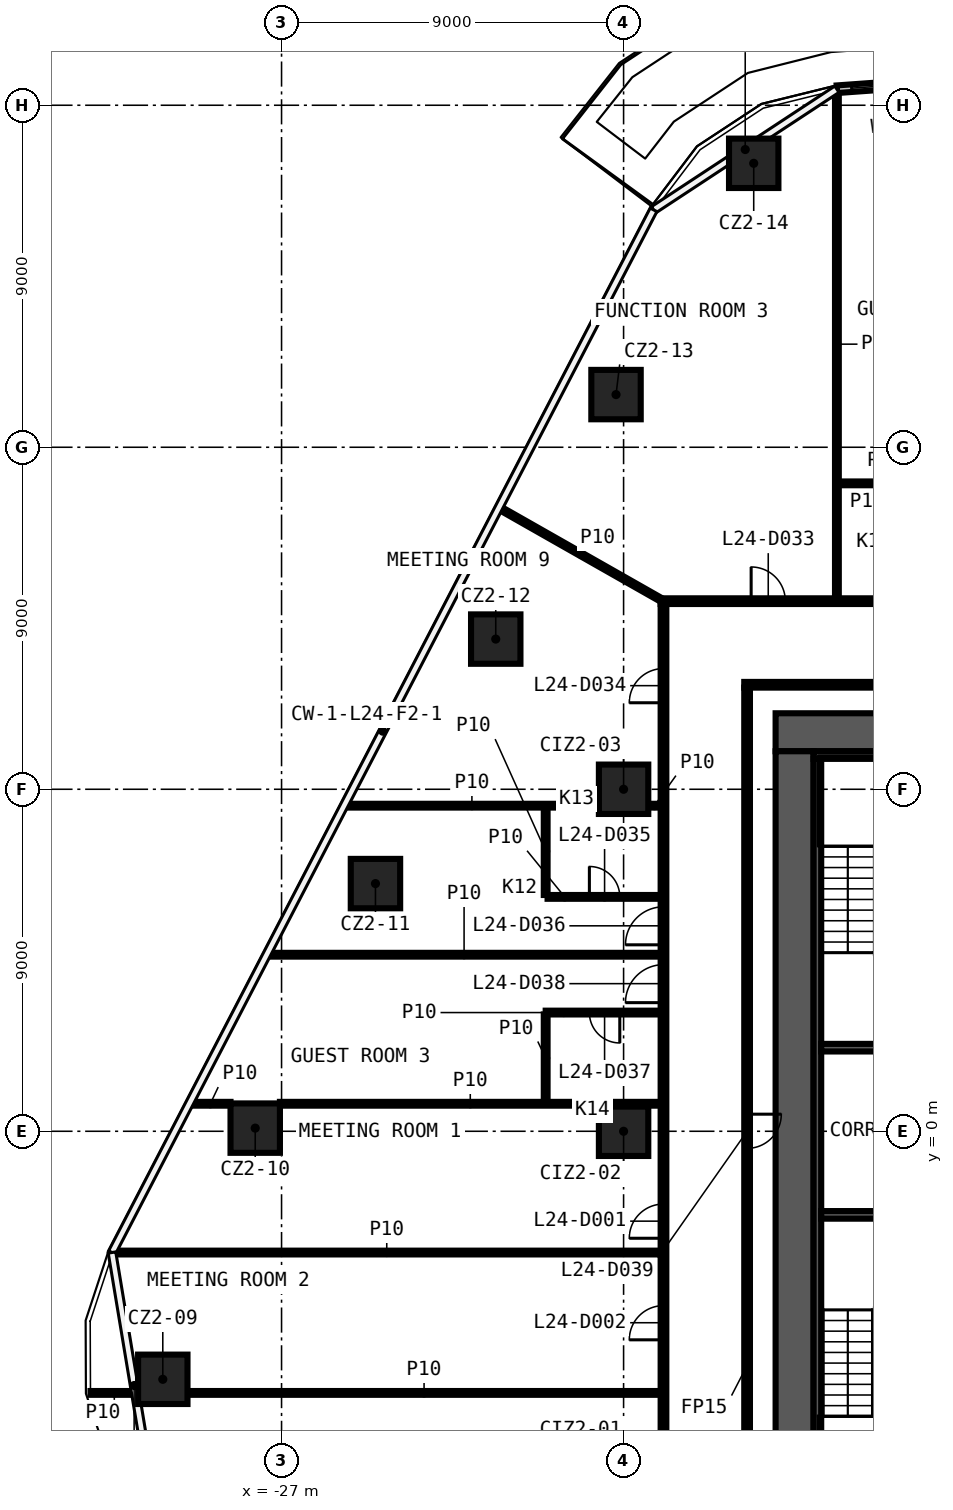
"""IFC4 building model, lengths in metres.
Left out: names, types, materials, properties, quantities, classifications, styles, units other than length and angle.
Written with IfcOpenShell. Run it as: python <this file> out.ifc"""

import sys

from ifc_helpers import new_model, si_unit, direction, frame, frame_2d, origin, origin_2d, place, context, subcontext, project, spatial, rectangle, extrude, element, fill, save


model = new_model("IFC4")
c1 = context("Model", 3, precision=1e-05, world=origin(), true_north=direction((0.0, 1.0)))
c2 = subcontext(c1, "Body", "Model", "MODEL_VIEW")
j1 = project(units=[si_unit("LENGTHUNIT", "METRE"), si_unit("PLANEANGLEUNIT", "RADIAN")], contexts=[c1])
p1 = place(None, origin())
s1 = spatial("IfcSite", under=j1, at=p1, CompositionType="ELEMENT")
p2 = place(p1, origin())
s2 = spatial("IfcBuilding", under=s1, at=p2, CompositionType="ELEMENT")
p3 = place(p2, frame((0.0, 0.0, 113.7)))
s3 = spatial("IfcBuildingStorey", under=s2, at=p3, CompositionType="ELEMENT", Elevation=113.7)
for number, where, z_axis, x_axis in (
    (1, (-30.125, -6.527, 0.0), (0.0, 0.0, 1.0), (1.0, 0.0, 0.0)),
    (2, (-27.693, 0.083, 0.0), (0.0, 0.0, 1.0), (1.0, 0.0, 0.0)),
    (3, (-24.529, 6.518, 0.0), (0.0, 0.0, 1.0), (1.0, 0.0, 0.0)),
    (4, (-21.364, 12.952, 0.0), (0.0, 0.0, 1.0), (1.0, 0.0, 0.0)),
    (5, (-18.199, 19.386, 0.0), (0.0, 0.0, 1.0), (1.0, 0.0, 0.0)),
    (6, (-14.576, 25.472, 0.0), (0.0, 0.0, 1.0), (1.0, 0.0, 0.0)),
    (7, (-18.0, 0.0, 0.0), (0.0, 0.0, 1.0), (1.0, 0.0, 0.0)),
    (8, (-18.0, 9.0, 0.0), (0.0, 0.0, 1.0), (1.0, 0.0, 0.0)),
):
    element("IfcColumn", number, at=place(p3, frame(where, z_axis=z_axis, x_axis=x_axis)), inside=s3, PredefinedType="COLUMN", context=c2, shape_type="SweptSolid", body=[
        extrude(rectangle(XDim=1.3, YDim=1.3, at=origin_2d()), origin(), (0.0, 0.0, 1.0), 3.3),
    ])
p4 = place(p3, frame((-32.027, -6.885, 0.0), z_axis=(0.0, 0.0, 1.0), x_axis=(1.0, 0.0, 0.0)))
e9 = element("IfcWall", 9, at=p4, inside=s3, PredefinedType="PARTITIONING", context=c2, shape_type="SweptSolid", body=[
    extrude(rectangle(XDim=1.252, YDim=0.1, at=frame_2d((0.626, 0.0))), origin(), (0.0, 0.0, 1.0), 3.3),
])
p5 = place(p3, frame((-29.475, -6.885, 0.0), z_axis=(0.0, 0.0, 1.0), x_axis=(1.0, 0.0, 0.0)))
e10 = element("IfcWall", 10, at=p5, inside=s3, PredefinedType="PARTITIONING", context=c2, shape_type="SweptSolid", body=[
    extrude(rectangle(XDim=12.45, YDim=0.1, at=frame_2d((6.225, 0.0))), origin(), (0.0, 0.0, 1.0), 3.3),
])
p6 = place(p3, frame((-31.439, -3.191, 0.0), z_axis=(0.0, 0.0, 1.0), x_axis=(1.0, 0.0, 0.0)))
e11 = element("IfcWall", 11, at=p6, inside=s3, PredefinedType="PARTITIONING", context=c2, shape_type="SweptSolid", body=[
    extrude(rectangle(XDim=14.414, YDim=0.1, at=frame_2d((7.207, 0.0))), origin(), (0.0, 0.0, 1.0), 3.3),
])
p7 = place(p3, frame((-29.406, 0.724, 0.0), z_axis=(0.0, 0.0, 1.0), x_axis=(1.0, 0.0, 0.0)))
e12 = element("IfcWall", 12, at=p7, inside=s3, PredefinedType="PARTITIONING", context=c2, shape_type="SweptSolid", body=[
    extrude(rectangle(XDim=1.063, YDim=0.1, at=frame_2d((0.531, 0.0))), origin(), (0.0, 0.0, 1.0), 3.3),
])
p8 = place(p3, frame((-27.043, 0.724, 0.0), z_axis=(0.0, 0.0, 1.0), x_axis=(1.0, 0.0, 0.0)))
e13 = element("IfcWall", 13, at=p8, inside=s3, PredefinedType="PARTITIONING", context=c2, shape_type="SweptSolid", body=[
    extrude(rectangle(XDim=10.018, YDim=0.1, at=frame_2d((5.009, 0.0))), origin(), (0.0, 0.0, 1.0), 3.3),
])
p9 = place(p3, frame((-17.025, 3.124, 0.0), z_axis=(0.0, 0.0, 1.0), x_axis=(-1.0, 0.0, 0.0)))
e14 = element("IfcWall", 14, at=p9, inside=s3, PredefinedType="PARTITIONING", context=c2, shape_type="SweptSolid", body=[
    extrude(rectangle(XDim=3.025, YDim=0.1, at=frame_2d((1.513, 0.0))), origin(), (0.0, 0.0, 1.0), 3.3),
])
p10 = place(p9, frame((1.075, 0.0, 0.0)))
e15 = element("IfcOpeningElement", 15, at=p10, cuts=e14, PredefinedType="OPENING", context=c2, shape_type="SweptSolid", body=[
    extrude(rectangle(XDim=0.8, YDim=2.1, at=frame_2d((0.4, 1.05))), frame((0.0, 0.06, 0.0), z_axis=(0.0, -1.0, 0.0), x_axis=(1.0, 0.0, 0.0)), (0.0, 0.0, 1.0), 0.12),
])
p11 = place(p3, frame((-27.369, 4.646, 0.0), z_axis=(0.0, 0.0, 1.0), x_axis=(1.0, 0.0, 0.0)))
e16 = element("IfcWall", 16, at=p11, inside=s3, PredefinedType="PARTITIONING", context=c2, shape_type="SweptSolid", body=[
    extrude(rectangle(XDim=10.344, YDim=0.1, at=frame_2d((5.172, 0.0))), origin(), (0.0, 0.0, 1.0), 3.3),
])
p12 = place(p3, frame((-20.0, 6.168, 0.0), z_axis=(0.0, 0.0, 1.0), x_axis=(1.0, 0.0, 0.0)))
e17 = element("IfcWall", 17, at=p12, inside=s3, PredefinedType="PARTITIONING", context=c2, shape_type="SweptSolid", body=[
    extrude(rectangle(XDim=2.975, YDim=0.1, at=frame_2d((1.488, 0.0))), origin(), (0.0, 0.0, 1.0), 3.3),
])
p13 = place(p12, frame((1.1, 0.0, 0.0)))
e18 = element("IfcOpeningElement", 18, at=p13, cuts=e17, PredefinedType="OPENING", context=c2, shape_type="SweptSolid", body=[
    extrude(rectangle(XDim=0.8, YDim=2.1, at=frame_2d((0.4, 1.05))), frame((0.0, 0.06, 0.0), z_axis=(0.0, -1.0, 0.0), x_axis=(1.0, 0.0, 0.0)), (0.0, 0.0, 1.0), 0.12),
])
p14 = place(p3, frame((-25.333, 8.568, 0.0), z_axis=(0.0, 0.0, 1.0), x_axis=(1.0, 0.0, 0.0)))
e19 = element("IfcWall", 19, at=p14, inside=s3, PredefinedType="PARTITIONING", context=c2, shape_type="SweptSolid", body=[
    extrude(rectangle(XDim=6.683, YDim=0.1, at=frame_2d((3.341, 0.0))), origin(), (0.0, 0.0, 1.0), 3.3),
])
p15 = place(p3, frame((-17.35, 8.568, 0.0), z_axis=(0.0, 0.0, 1.0), x_axis=(1.0, 0.0, 0.0)))
e20 = element("IfcWall", 20, at=p15, inside=s3, PredefinedType="PARTITIONING", context=c2, shape_type="SweptSolid", body=[
    extrude(rectangle(XDim=0.325, YDim=0.1, at=frame_2d((0.163, 0.0))), origin(), (0.0, 0.0, 1.0), 3.3),
])
p16 = place(p3, frame((-14.825, 11.75, 0.0), z_axis=(0.0, 0.0, 1.0), x_axis=(1.0, 0.0, 0.0)))
e21 = element("IfcWall", 21, at=p16, inside=s3, PredefinedType="PARTITIONING", context=c2, shape_type="SweptSolid", body=[
    extrude(rectangle(XDim=16.625, YDim=0.15, at=frame_2d((8.312, 0.0))), origin(), (0.0, 0.0, 1.0), 3.3),
])
p17 = place(p3, frame((-17.025, 13.95, 0.0), z_axis=(0.0, 0.0, 1.0), x_axis=(1.0, 0.0, 0.0)))
e22 = element("IfcWall", 22, at=p17, inside=s3, PredefinedType="PARTITIONING", context=c2, shape_type="SweptSolid", body=[
    extrude(rectangle(XDim=34.05, YDim=0.15, at=frame_2d((17.025, 0.0))), origin(), (0.0, 0.0, 1.0), 3.3),
])
p18 = place(p17, frame((29.735, 0.0, 0.0)))
e23 = element("IfcOpeningElement", 23, at=p18, cuts=e22, PredefinedType="OPENING", context=c2, shape_type="SweptSolid", body=[
    extrude(rectangle(XDim=1.0, YDim=2.1, at=frame_2d((0.5, 1.05))), frame((0.0, 0.085, 0.0), z_axis=(0.0, -1.0, 0.0), x_axis=(1.0, 0.0, 0.0)), (0.0, 0.0, 1.0), 0.17),
])
p19 = place(p17, frame((25.513, 0.0, 0.0)))
e24 = element("IfcOpeningElement", 24, at=p19, cuts=e22, PredefinedType="OPENING", context=c2, shape_type="SweptSolid", body=[
    extrude(rectangle(XDim=1.0, YDim=2.1, at=frame_2d((0.5, 1.05))), frame((0.0, 0.085, 0.0), z_axis=(0.0, -1.0, 0.0), x_axis=(1.0, 0.0, 0.0)), (0.0, 0.0, 1.0), 0.17),
])
p20 = place(p17, frame((18.631, 0.0, 0.0)))
e25 = element("IfcOpeningElement", 25, at=p20, cuts=e22, PredefinedType="OPENING", context=c2, shape_type="SweptSolid", body=[
    extrude(rectangle(XDim=1.0, YDim=2.1, at=frame_2d((0.5, 1.05))), frame((0.0, 0.085, 0.0), z_axis=(0.0, -1.0, 0.0), x_axis=(1.0, 0.0, 0.0)), (0.0, 0.0, 1.0), 0.17),
])
p21 = place(p17, frame((16.545, 0.0, 0.0)))
e26 = element("IfcOpeningElement", 26, at=p21, cuts=e22, PredefinedType="OPENING", context=c2, shape_type="SweptSolid", body=[
    extrude(rectangle(XDim=1.0, YDim=2.1, at=frame_2d((0.5, 1.05))), frame((0.0, 0.085, 0.0), z_axis=(0.0, -1.0, 0.0), x_axis=(1.0, 0.0, 0.0)), (0.0, 0.0, 1.0), 0.17),
])
p22 = place(p17, frame((9.659, 0.0, 0.0)))
e27 = element("IfcOpeningElement", 27, at=p22, cuts=e22, PredefinedType="OPENING", context=c2, shape_type="SweptSolid", body=[
    extrude(rectangle(XDim=1.0, YDim=2.1, at=frame_2d((0.5, 1.05))), frame((0.0, 0.085, 0.0), z_axis=(0.0, -1.0, 0.0), x_axis=(1.0, 0.0, 0.0)), (0.0, 0.0, 1.0), 0.17),
])
p23 = place(p17, frame((7.577, 0.0, 0.0)))
e28 = element("IfcOpeningElement", 28, at=p23, cuts=e22, PredefinedType="OPENING", context=c2, shape_type="SweptSolid", body=[
    extrude(rectangle(XDim=1.0, YDim=2.1, at=frame_2d((0.5, 1.05))), frame((0.0, 0.085, 0.0), z_axis=(0.0, -1.0, 0.0), x_axis=(1.0, 0.0, 0.0)), (0.0, 0.0, 1.0), 0.17),
])
p24 = place(p17, frame((2.381, 0.0, 0.0)))
e29 = element("IfcOpeningElement", 29, at=p24, cuts=e22, PredefinedType="OPENING", context=c2, shape_type="SweptSolid", body=[
    extrude(rectangle(XDim=0.9, YDim=2.1, at=frame_2d((0.45, 1.05))), frame((0.0, 0.085, 0.0), z_axis=(0.0, -1.0, 0.0), x_axis=(1.0, 0.0, 0.0)), (0.0, 0.0, 1.0), 0.17),
])
p25 = place(p3, frame((-12.337, 17.05, 0.0), z_axis=(0.0, 0.0, 1.0), x_axis=(1.0, 0.0, 0.0)))
e30 = element("IfcWall", 30, at=p25, inside=s3, PredefinedType="PARTITIONING", context=c2, shape_type="SweptSolid", body=[
    extrude(rectangle(XDim=2.4, YDim=0.1, at=frame_2d((1.2, 0.0))), origin(), (0.0, 0.0, 1.0), 3.3),
])
p26 = place(p3, frame((-12.387, 14.025, 0.0), z_axis=(0.0, 0.0, 1.0), x_axis=(0.0, 1.0, 0.0)))
e31 = element("IfcWall", 31, at=p26, inside=s3, PredefinedType="PARTITIONING", context=c2, shape_type="SweptSolid", body=[
    extrude(rectangle(XDim=13.376, YDim=0.1, at=frame_2d((6.688, 0.0))), origin(), (0.0, 0.0, 1.0), 3.3),
])
p27 = place(p3, frame((-14.75, 11.675, 0.0), z_axis=(0.0, 0.0, 1.0), x_axis=(0.0, -1.0, 0.0)))
e32 = element("IfcWall", 32, at=p27, inside=s3, PredefinedType="PARTITIONING", context=c2, shape_type="SweptSolid", body=[
    extrude(rectangle(XDim=23.35, YDim=0.15, at=frame_2d((11.675, 0.0))), origin(), (0.0, 0.0, 1.0), 3.3),
])
p28 = place(p27, frame((11.225, 0.0, 0.0)))
e33 = element("IfcOpeningElement", 33, at=p28, cuts=e32, PredefinedType="OPENING", context=c2, shape_type="SweptSolid", body=[
    extrude(rectangle(XDim=0.9, YDim=2.1, at=frame_2d((0.45, 1.05))), frame((0.0, 0.085, 0.0), z_axis=(0.0, -1.0, 0.0), x_axis=(1.0, 0.0, 0.0)), (0.0, 0.0, 1.0), 0.17),
])
p29 = place(p3, frame((-16.95, -13.875, 0.0), z_axis=(0.0, 0.0, 1.0), x_axis=(0.0, 1.0, 0.0)))
e34 = element("IfcWall", 34, at=p29, inside=s3, PredefinedType="PARTITIONING", context=c2, shape_type="SweptSolid", body=[
    extrude(rectangle(XDim=27.75, YDim=0.15, at=frame_2d((13.875, 0.0))), origin(), (0.0, 0.0, 1.0), 3.3),
])
p30 = place(p29, frame((11.06, 0.0, 0.0)))
e35 = element("IfcOpeningElement", 35, at=p30, cuts=e34, PredefinedType="OPENING", context=c2, shape_type="SweptSolid", body=[
    extrude(rectangle(XDim=0.9, YDim=2.1, at=frame_2d((0.45, 1.05))), frame((0.0, 0.085, 0.0), z_axis=(0.0, -1.0, 0.0), x_axis=(1.0, 0.0, 0.0)), (0.0, 0.0, 1.0), 0.17),
])
p31 = place(p29, frame((8.387, 0.0, 0.0)))
e36 = element("IfcOpeningElement", 36, at=p31, cuts=e34, PredefinedType="OPENING", context=c2, shape_type="SweptSolid", body=[
    extrude(rectangle(XDim=0.9, YDim=2.1, at=frame_2d((0.45, 1.05))), frame((0.0, 0.085, 0.0), z_axis=(0.0, -1.0, 0.0), x_axis=(1.0, 0.0, 0.0)), (0.0, 0.0, 1.0), 0.17),
])
p32 = place(p29, frame((1.666, 0.0, 0.0)))
e37 = element("IfcOpeningElement", 37, at=p32, cuts=e34, PredefinedType="OPENING", context=c2, shape_type="SweptSolid", body=[
    extrude(rectangle(XDim=0.9, YDim=2.1, at=frame_2d((0.45, 1.05))), frame((0.0, 0.085, 0.0), z_axis=(0.0, -1.0, 0.0), x_axis=(1.0, 0.0, 0.0)), (0.0, 0.0, 1.0), 0.17),
])
p33 = place(p29, frame((25.152, 0.0, 0.0)))
e38 = element("IfcOpeningElement", 38, at=p33, cuts=e34, PredefinedType="OPENING", context=c2, shape_type="SweptSolid", body=[
    extrude(rectangle(XDim=0.9, YDim=2.1, at=frame_2d((0.45, 1.05))), frame((0.0, 0.085, 0.0), z_axis=(0.0, -1.0, 0.0), x_axis=(1.0, 0.0, 0.0)), (0.0, 0.0, 1.0), 0.17),
])
p34 = place(p29, frame((18.782, 0.0, 0.0)))
e39 = element("IfcOpeningElement", 39, at=p34, cuts=e34, PredefinedType="OPENING", context=c2, shape_type="SweptSolid", body=[
    extrude(rectangle(XDim=1.0, YDim=2.1, at=frame_2d((0.5, 1.05))), frame((0.0, 0.085, 0.0), z_axis=(0.0, -1.0, 0.0), x_axis=(1.0, 0.0, 0.0)), (0.0, 0.0, 1.0), 0.17),
])
p35 = place(p29, frame((17.26, 0.0, 0.0)))
e40 = element("IfcOpeningElement", 40, at=p35, cuts=e34, PredefinedType="OPENING", context=c2, shape_type="SweptSolid", body=[
    extrude(rectangle(XDim=1.0, YDim=2.1, at=frame_2d((0.5, 1.05))), frame((0.0, 0.085, 0.0), z_axis=(0.0, -1.0, 0.0), x_axis=(1.0, 0.0, 0.0)), (0.0, 0.0, 1.0), 0.17),
])
p36 = place(p3, frame((-20.05, 0.774, 0.0), z_axis=(0.0, 0.0, 1.0), x_axis=(0.0, 1.0, 0.0)))
e41 = element("IfcWall", 41, at=p36, inside=s3, PredefinedType="PARTITIONING", context=c2, shape_type="SweptSolid", body=[
    extrude(rectangle(XDim=2.3, YDim=0.1, at=frame_2d((1.15, 0.0))), origin(), (0.0, 0.0, 1.0), 3.3),
])
p37 = place(p3, frame((-20.05, 6.218, 0.0), z_axis=(0.0, 0.0, 1.0), x_axis=(0.0, 1.0, 0.0)))
e42 = element("IfcWall", 42, at=p37, inside=s3, PredefinedType="PARTITIONING", context=c2, shape_type="SweptSolid", body=[
    extrude(rectangle(XDim=2.3, YDim=0.1, at=frame_2d((1.15, 0.0))), origin(), (0.0, 0.0, 1.0), 3.3),
])
p38 = place(p3, frame((-21.264, 16.401, 0.0), z_axis=(0.0, 0.0, 1.0), x_axis=(0.869409483432, -0.494092248592, 0.0)))
e43 = element("IfcWall", 43, at=p38, inside=s3, PredefinedType="PARTITIONING", context=c2, shape_type="SweptSolid", body=[
    extrude(rectangle(XDim=4.962, YDim=0.1, at=frame_2d((2.481, 0.0))), origin(), (0.0, 0.0, 1.0), 3.3),
])
p39 = place(p3, frame((-7.909, 27.743, 0.0), z_axis=(0.0, 0.0, 1.0), x_axis=(-0.997423796537, -0.071734023317, 0.0)))
e44 = element("IfcWall", 44, at=p39, inside=s3, PredefinedType="SOLIDWALL", context=c2, shape_type="SweptSolid", body=[
    extrude(rectangle(XDim=4.489, YDim=0.2, at=frame_2d((2.245, 0.0))), origin(), (0.0, 0.0, 1.0), 3.3),
])
p40 = place(p39, frame((2.5, 0.0, 0.6)))
e45 = element("IfcOpeningElement", 45, at=p40, cuts=e44, PredefinedType="OPENING", context=c2, shape_type="SweptSolid", body=[
    extrude(rectangle(XDim=1.6, YDim=2.4, at=frame_2d((0.8, 1.2))), frame((0.0, 0.11, 0.0), z_axis=(0.0, -1.0, 0.0), x_axis=(1.0, 0.0, 0.0)), (0.0, 0.0, 1.0), 0.22),
])
p41 = place(p39, frame((1.0, 0.0, 0.0)))
e46 = element("IfcOpeningElement", 46, at=p41, cuts=e44, PredefinedType="OPENING", context=c2, shape_type="SweptSolid", body=[
    extrude(rectangle(XDim=1.2, YDim=2.4, at=frame_2d((0.6, 1.2))), frame((0.0, 0.11, 0.0), z_axis=(0.0, -1.0, 0.0), x_axis=(1.0, 0.0, 0.0)), (0.0, 0.0, 1.0), 0.22),
])
p42 = place(p3, frame((-14.0, 10.5, 0.0), z_axis=(0.0, 0.0, 1.0), x_axis=(1.0, 0.0, 0.0)))
e47 = element("IfcWall", 47, at=p42, inside=s3, PredefinedType="SHEAR", context=c2, shape_type="SweptSolid", body=[
    extrude(rectangle(XDim=28.0, YDim=1.0, at=frame_2d((14.0, 0.0))), origin(), (0.0, 0.0, 1.0), 3.3),
])
p43 = place(p42, frame((15.9, 0.0, 0.0)))
e48 = element("IfcOpeningElement", 48, at=p43, cuts=e47, PredefinedType="OPENING", context=c2, shape_type="SweptSolid", body=[
    extrude(rectangle(XDim=1.6, YDim=2.1, at=frame_2d((0.8, 1.05))), frame((0.0, 0.51, 0.0), z_axis=(0.0, -1.0, 0.0), x_axis=(1.0, 0.0, 0.0)), (0.0, 0.0, 1.0), 1.02),
])
p44 = place(p3, frame((-13.5, -10.0, 0.0), z_axis=(0.0, 0.0, 1.0), x_axis=(0.0, 1.0, 0.0)))
e49 = element("IfcWall", 49, at=p44, inside=s3, PredefinedType="SHEAR", context=c2, shape_type="SweptSolid", body=[
    extrude(rectangle(XDim=20.0, YDim=1.0, at=frame_2d((10.0, 0.0))), origin(), (0.0, 0.0, 1.0), 3.3),
])
p45 = place(p3, frame((-13.0, 9.9, 0.0), z_axis=(0.0, 0.0, 1.0), x_axis=(1.0, 0.0, 0.0)))
e50 = element("IfcWall", 50, at=p45, inside=s3, PredefinedType="SHEAR", context=c2, shape_type="SweptSolid", body=[
    extrude(rectangle(XDim=14.5, YDim=0.2, at=frame_2d((7.25, 0.0))), origin(), (0.0, 0.0, 1.0), 3.3),
])
p46 = place(p3, frame((-12.9, -9.8, 0.0), z_axis=(0.0, 0.0, 1.0), x_axis=(0.0, 1.0, 0.0)))
e51 = element("IfcWall", 51, at=p46, inside=s3, PredefinedType="SHEAR", context=c2, shape_type="SweptSolid", body=[
    extrude(rectangle(XDim=19.6, YDim=0.2, at=frame_2d((9.8, 0.0))), origin(), (0.0, 0.0, 1.0), 3.3),
])
for number, where, z_axis, x_axis in (
    (52, (-9.45, 2.2, 0.0), (0.0, 0.0, 1.0), (-1.0, 0.0, 0.0)),
    (53, (-9.45, -2.2, 0.0), (0.0, 0.0, 1.0), (-1.0, 0.0, 0.0)),
):
    element("IfcWall", number, at=place(p3, frame(where, z_axis=z_axis, x_axis=x_axis)), inside=s3, PredefinedType="SHEAR", context=c2, shape_type="SweptSolid", body=[
        extrude(rectangle(XDim=3.35, YDim=0.2, at=frame_2d((1.675, 0.0))), origin(), (0.0, 0.0, 1.0), 3.3),
    ])
p47 = place(p30, origin())
e54 = element("IfcDoor", 54, at=p47, inside=s3, OperationType="SINGLE_SWING_RIGHT", PredefinedType="DOOR", context=c2, shape_type="SweptSolid", body=[
    extrude(rectangle(XDim=0.9, YDim=2.1, at=frame_2d((0.45, 1.05))), frame((0.0, 0.025, 0.0), z_axis=(0.0, -1.0, 0.0), x_axis=(1.0, 0.0, 0.0)), (0.0, 0.0, 1.0), 0.05),
])
fill(e35, e54)
p48 = place(p31, origin())
e55 = element("IfcDoor", 55, at=p48, inside=s3, OperationType="SINGLE_SWING_LEFT", PredefinedType="DOOR", context=c2, shape_type="SweptSolid", body=[
    extrude(rectangle(XDim=0.9, YDim=2.1, at=frame_2d((0.45, 1.05))), frame((0.0, 0.025, 0.0), z_axis=(0.0, -1.0, 0.0), x_axis=(1.0, 0.0, 0.0)), (0.0, 0.0, 1.0), 0.05),
])
fill(e36, e55)
p49 = place(p24, origin())
e56 = element("IfcDoor", 56, at=p49, inside=s3, OperationType="SINGLE_SWING_RIGHT", PredefinedType="DOOR", context=c2, shape_type="SweptSolid", body=[
    extrude(rectangle(XDim=0.9, YDim=2.1, at=frame_2d((0.45, 1.05))), frame((0.0, 0.025, 0.0), z_axis=(0.0, -1.0, 0.0), x_axis=(1.0, 0.0, 0.0)), (0.0, 0.0, 1.0), 0.05),
])
fill(e29, e56)
p50 = place(p33, origin())
e57 = element("IfcDoor", 57, at=p50, inside=s3, OperationType="SINGLE_SWING_LEFT", PredefinedType="DOOR", context=c2, shape_type="SweptSolid", body=[
    extrude(rectangle(XDim=0.9, YDim=2.1, at=frame_2d((0.45, 1.05))), frame((0.0, 0.025, 0.0), z_axis=(0.0, -1.0, 0.0), x_axis=(1.0, 0.0, 0.0)), (0.0, 0.0, 1.0), 0.05),
])
fill(e38, e57)
p51 = place(p13, origin())
e58 = element("IfcDoor", 58, at=p51, inside=s3, OperationType="SINGLE_SWING_LEFT", PredefinedType="DOOR", context=c2, shape_type="SweptSolid", body=[
    extrude(rectangle(XDim=0.8, YDim=2.1, at=frame_2d((0.4, 1.05))), frame((0.0, 0.025, 0.0), z_axis=(0.0, -1.0, 0.0), x_axis=(1.0, 0.0, 0.0)), (0.0, 0.0, 1.0), 0.05),
])
fill(e18, e58)
p52 = place(p34, origin())
e59 = element("IfcDoor", 59, at=p52, inside=s3, OperationType="SINGLE_SWING_RIGHT", PredefinedType="DOOR", context=c2, shape_type="SweptSolid", body=[
    extrude(rectangle(XDim=1.0, YDim=2.1, at=frame_2d((0.5, 1.05))), frame((0.0, 0.025, 0.0), z_axis=(0.0, -1.0, 0.0), x_axis=(1.0, 0.0, 0.0)), (0.0, 0.0, 1.0), 0.05),
])
fill(e39, e59)
p53 = place(p10, origin())
e60 = element("IfcDoor", 60, at=p53, inside=s3, OperationType="SINGLE_SWING_RIGHT", PredefinedType="DOOR", context=c2, shape_type="SweptSolid", body=[
    extrude(rectangle(XDim=0.8, YDim=2.1, at=frame_2d((0.4, 1.05))), frame((0.0, 0.025, 0.0), z_axis=(0.0, -1.0, 0.0), x_axis=(1.0, 0.0, 0.0)), (0.0, 0.0, 1.0), 0.05),
])
fill(e15, e60)
p54 = place(p35, origin())
e61 = element("IfcDoor", 61, at=p54, inside=s3, OperationType="SINGLE_SWING_LEFT", PredefinedType="DOOR", context=c2, shape_type="SweptSolid", body=[
    extrude(rectangle(XDim=1.0, YDim=2.1, at=frame_2d((0.5, 1.05))), frame((0.0, 0.025, 0.0), z_axis=(0.0, -1.0, 0.0), x_axis=(1.0, 0.0, 0.0)), (0.0, 0.0, 1.0), 0.05),
])
fill(e40, e61)
p55 = place(p28, origin())
e62 = element("IfcDoor", 62, at=p55, inside=s3, OperationType="SINGLE_SWING_RIGHT", PredefinedType="DOOR", context=c2, shape_type="SweptSolid", body=[
    extrude(rectangle(XDim=0.9, YDim=2.1, at=frame_2d((0.45, 1.05))), frame((0.0, 0.025, 0.0), z_axis=(0.0, -1.0, 0.0), x_axis=(1.0, 0.0, 0.0)), (0.0, 0.0, 1.0), 0.05),
])
fill(e33, e62)
p56 = place(p40, origin())
e63 = element("IfcWindow", 63, at=p56, inside=s3, PartitioningType="SINGLE_PANEL", PredefinedType="WINDOW", context=c2, shape_type="SweptSolid", body=[
    extrude(rectangle(XDim=1.6, YDim=2.4, at=frame_2d((0.8, 1.2))), frame((0.0, 0.03, 0.0), z_axis=(0.0, -1.0, 0.0), x_axis=(1.0, 0.0, 0.0)), (0.0, 0.0, 1.0), 0.06),
])
fill(e45, e63)
save(model, sys.argv[1])
